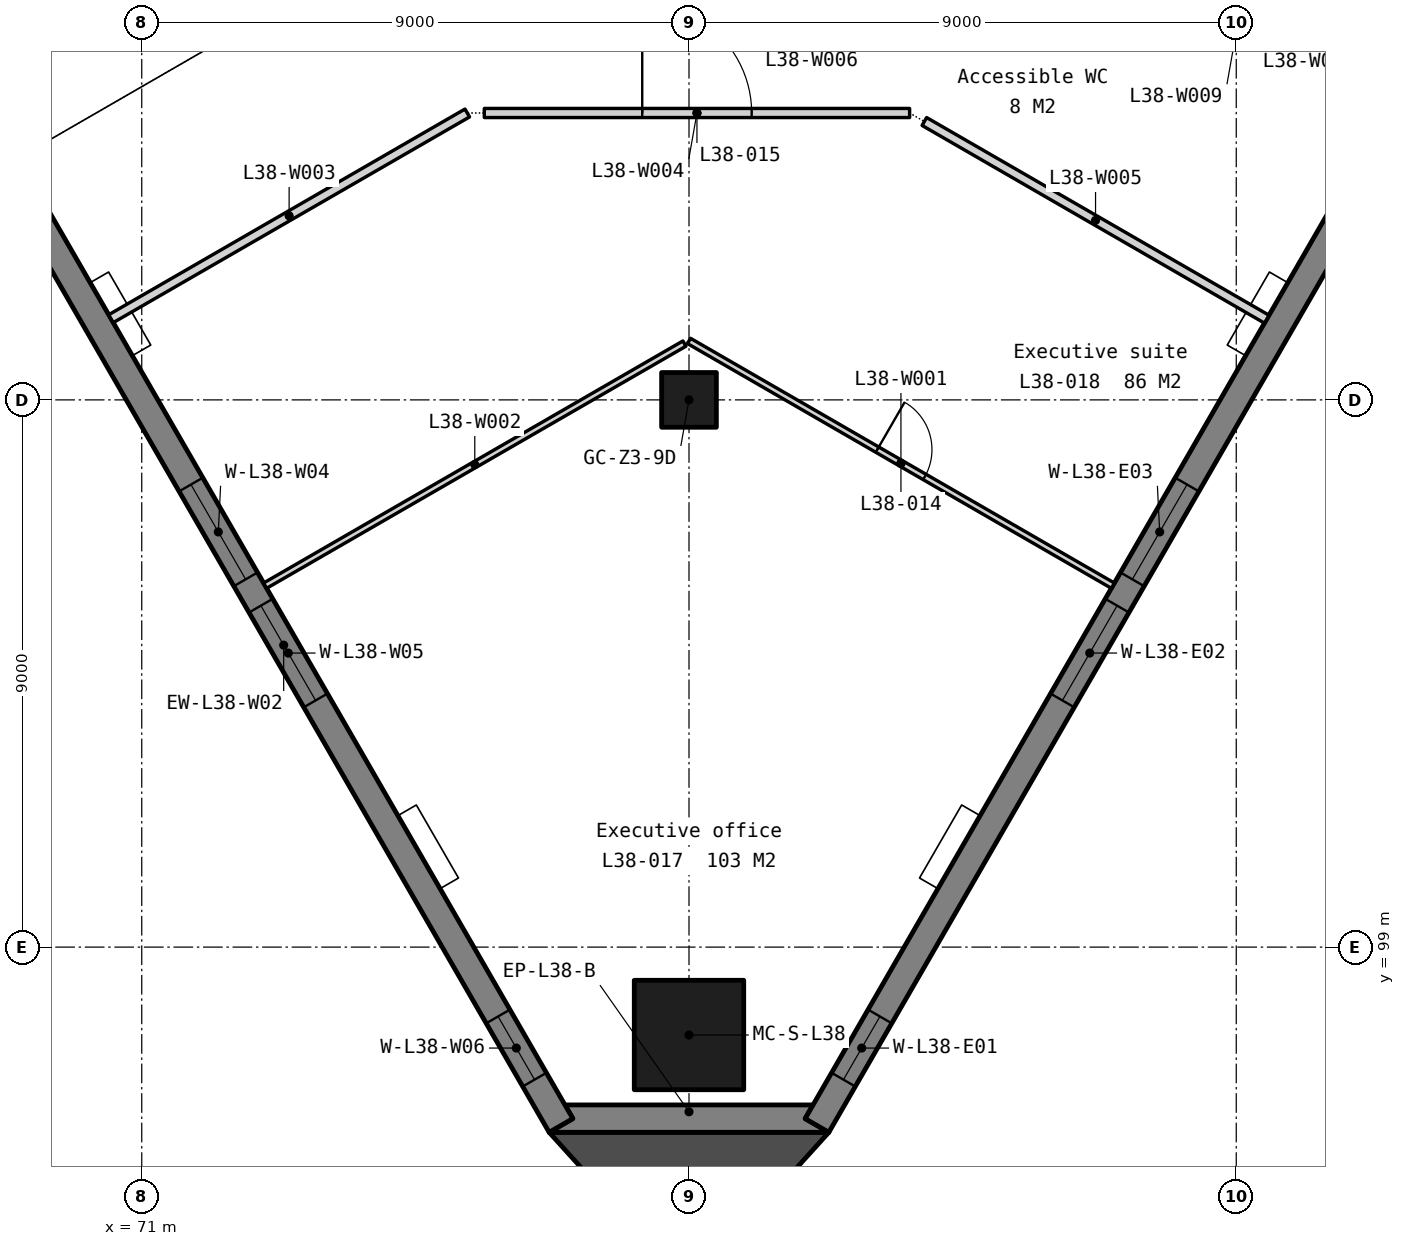
"""IFC4 building model, lengths in metres.
Left out: names, types, materials, properties, quantities, classifications, styles, units other than length and angle.
Written with IfcOpenShell. Run it as: python <this file> out.ifc"""

import sys

from ifc_helpers import new_model, si_unit, direction, frame, frame_2d, origin, origin_2d, place, context, subcontext, project, spatial, polyline, rectangle, outline, extrude, element, fill, save


model = new_model("IFC4")
c1 = context("Model", 3, precision=1e-05, world=origin(), true_north=direction((0.0, 1.0)))
c2 = subcontext(c1, "Body", "Model", "MODEL_VIEW")
j1 = project(units=[si_unit("LENGTHUNIT", "METRE"), si_unit("PLANEANGLEUNIT", "RADIAN")], contexts=[c1])
p1 = place(None, origin())
s1 = spatial("IfcSite", under=j1, at=p1, CompositionType="ELEMENT")
p2 = place(p1, origin())
s2 = spatial("IfcBuilding", under=s1, at=p2, CompositionType="ELEMENT")
p3 = place(p2, frame((0.0, 0.0, 152.0)))
s3 = spatial("IfcBuildingStorey", under=s2, at=p3, CompositionType="ELEMENT", Elevation=152.0)
p4 = place(p3, frame((80.0, 108.0, 0.0), z_axis=(0.0, 0.0, 1.0), x_axis=(1.0, 0.0, 0.0)))
e1 = element("IfcColumn", 1, at=p4, inside=s3, PredefinedType="COLUMN", context=c2, shape_type="SweptSolid", body=[
    extrude(rectangle(XDim=0.9, YDim=0.9, at=origin_2d()), origin(), (0.0, 0.0, 1.0), 3.9),
])
p5 = place(p3, frame((80.0, 97.554, 0.0), z_axis=(0.0, 0.0, 1.0), x_axis=(1.0, 0.0, 0.0)))
e2 = element("IfcColumn", 2, at=p5, inside=s3, PredefinedType="COLUMN", context=c2, shape_type="SweptSolid", body=[
    extrude(rectangle(XDim=1.8, YDim=1.8, at=origin_2d()), origin(), (0.0, 0.0, 1.0), 3.9),
])
p6 = place(p3, frame((0.0, 0.0, -0.15)))
e3 = element("IfcWall", 3, at=p6, inside=s3, PredefinedType="SOLIDWALL", context=c2, shape_type="SweptSolid", body=[
    extrude(outline(polyline([(77.7, 95.954), (78.09, 96.179), (77.96, 96.404), (82.04, 96.404), (81.91, 96.179), (82.3, 95.954), (77.7, 95.954)])), origin(), (0.0, 0.0, 1.0), 3.9),
])
p7 = place(p3, frame((68.773, 111.866, -0.15), z_axis=(0.0, 0.0, 1.0), x_axis=(0.499989280757, -0.866031592454, 0.0)))
e4 = element("IfcWall", 4, at=p7, inside=s3, PredefinedType="SOLIDWALL", context=c2, shape_type="SweptSolid", body=[
    extrude(outline(polyline([(18.243, 3.9), (18.243, 0.0), (0.0, 0.0), (0.0, 3.9), (18.243, 3.9)])), frame((0.0, 0.225, 0.0), z_axis=(0.0, -1.0, 0.0), x_axis=(1.0, 0.0, 0.0)), (0.0, 0.0, 1.0), 0.45),
])
p8 = place(p7, frame((6.072, 0.0, 0.95)))
e5 = element("IfcOpeningElement", 5, at=p8, cuts=e4, PredefinedType="OPENING", context=c2, shape_type="SweptSolid", body=[
    extrude(rectangle(XDim=1.8, YDim=2.2, at=frame_2d((0.9, 1.1))), frame((0.0, 0.235, 0.0), z_axis=(0.0, -1.0, 0.0), x_axis=(1.0, 0.0, 0.0)), (0.0, 0.0, 1.0), 0.47),
])
p9 = place(p7, frame((8.372, 0.0, 0.95)))
e6 = element("IfcOpeningElement", 6, at=p9, cuts=e4, PredefinedType="OPENING", context=c2, shape_type="SweptSolid", body=[
    extrude(rectangle(XDim=1.8, YDim=2.2, at=frame_2d((0.9, 1.1))), frame((0.0, 0.235, 0.0), z_axis=(0.0, -1.0, 0.0), x_axis=(1.0, 0.0, 0.0)), (0.0, 0.0, 1.0), 0.47),
])
p10 = place(p7, frame((16.173, 0.0, 0.95)))
e7 = element("IfcOpeningElement", 7, at=p10, cuts=e4, PredefinedType="OPENING", context=c2, shape_type="SweptSolid", body=[
    extrude(rectangle(XDim=1.2, YDim=2.2, at=frame_2d((0.6, 1.1))), frame((0.0, 0.235, 0.0), z_axis=(0.0, -1.0, 0.0), x_axis=(1.0, 0.0, 0.0)), (0.0, 0.0, 1.0), 0.47),
])
p11 = place(p3, frame((82.105, 96.067, -0.15), z_axis=(0.0, 0.0, 1.0), x_axis=(0.499997369791, 0.866026922331, 0.0)))
e8 = element("IfcWall", 8, at=p11, inside=s3, PredefinedType="SOLIDWALL", context=c2, shape_type="SweptSolid", body=[
    extrude(outline(polyline([(40.486, 0.0), (40.486, 3.9), (0.0, 3.9), (0.0, 0.0), (40.486, 0.0)])), frame((0.0, 0.225, 0.0), z_axis=(0.0, -1.0, 0.0), x_axis=(1.0, 0.0, 0.0)), (0.0, 0.0, 1.0), 0.45),
])
p12 = place(p11, frame((0.87, 0.0, 0.95)))
e9 = element("IfcOpeningElement", 9, at=p12, cuts=e8, PredefinedType="OPENING", context=c2, shape_type="SweptSolid", body=[
    extrude(rectangle(XDim=1.2, YDim=2.2, at=frame_2d((0.6, 1.1))), frame((0.0, 0.235, 0.0), z_axis=(0.0, -1.0, 0.0), x_axis=(1.0, 0.0, 0.0)), (0.0, 0.0, 1.0), 0.47),
])
p13 = place(p11, frame((8.072, 0.0, 0.95)))
e10 = element("IfcOpeningElement", 10, at=p13, cuts=e8, PredefinedType="OPENING", context=c2, shape_type="SweptSolid", body=[
    extrude(rectangle(XDim=1.8, YDim=2.2, at=frame_2d((0.9, 1.1))), frame((0.0, 0.235, 0.0), z_axis=(0.0, -1.0, 0.0), x_axis=(1.0, 0.0, 0.0)), (0.0, 0.0, 1.0), 0.47),
])
p14 = place(p11, frame((10.372, 0.0, 0.95)))
e11 = element("IfcOpeningElement", 11, at=p14, cuts=e8, PredefinedType="OPENING", context=c2, shape_type="SweptSolid", body=[
    extrude(rectangle(XDim=1.8, YDim=2.2, at=frame_2d((0.9, 1.1))), frame((0.0, 0.235, 0.0), z_axis=(0.0, -1.0, 0.0), x_axis=(1.0, 0.0, 0.0)), (0.0, 0.0, 1.0), 0.47),
])
p15 = place(p11, frame((18.193, 0.0, 0.95)))
e12 = element("IfcOpeningElement", 12, at=p15, cuts=e8, PredefinedType="OPENING", context=c2, shape_type="SweptSolid", body=[
    extrude(rectangle(XDim=1.8, YDim=2.2, at=frame_2d((0.9, 1.1))), frame((0.0, 0.235, 0.0), z_axis=(0.0, -1.0, 0.0), x_axis=(1.0, 0.0, 0.0)), (0.0, 0.0, 1.0), 0.47),
])
p16 = place(p11, frame((20.493, 0.0, 0.95)))
e13 = element("IfcOpeningElement", 13, at=p16, cuts=e8, PredefinedType="OPENING", context=c2, shape_type="SweptSolid", body=[
    extrude(rectangle(XDim=1.8, YDim=2.2, at=frame_2d((0.9, 1.1))), frame((0.0, 0.235, 0.0), z_axis=(0.0, -1.0, 0.0), x_axis=(1.0, 0.0, 0.0)), (0.0, 0.0, 1.0), 0.47),
])
p17 = place(p11, frame((28.315, 0.0, 0.95)))
e14 = element("IfcOpeningElement", 14, at=p17, cuts=e8, PredefinedType="OPENING", context=c2, shape_type="SweptSolid", body=[
    extrude(rectangle(XDim=1.8, YDim=2.2, at=frame_2d((0.9, 1.1))), frame((0.0, 0.235, 0.0), z_axis=(0.0, -1.0, 0.0), x_axis=(1.0, 0.0, 0.0)), (0.0, 0.0, 1.0), 0.47),
])
p18 = place(p11, frame((30.615, 0.0, 0.95)))
e15 = element("IfcOpeningElement", 15, at=p18, cuts=e8, PredefinedType="OPENING", context=c2, shape_type="SweptSolid", body=[
    extrude(rectangle(XDim=1.8, YDim=2.2, at=frame_2d((0.9, 1.1))), frame((0.0, 0.235, 0.0), z_axis=(0.0, -1.0, 0.0), x_axis=(1.0, 0.0, 0.0)), (0.0, 0.0, 1.0), 0.47),
])
p19 = place(p11, frame((38.417, 0.0, 0.95)))
e16 = element("IfcOpeningElement", 16, at=p19, cuts=e8, PredefinedType="OPENING", context=c2, shape_type="SweptSolid", body=[
    extrude(rectangle(XDim=1.2, YDim=2.2, at=frame_2d((0.6, 1.1))), frame((0.0, 0.235, 0.0), z_axis=(0.0, -1.0, 0.0), x_axis=(1.0, 0.0, 0.0)), (0.0, 0.0, 1.0), 0.47),
])
p20 = place(p2, frame((0.0, 0.0, 148.1)))
s4 = spatial("IfcBuildingStorey", under=s2, at=p20, CompositionType="ELEMENT", Elevation=148.1)
p21 = place(p20, frame((68.466, 111.948, 0.0), z_axis=(0.0, 0.0, 1.0), x_axis=(0.866005453737, 0.500034552904, 0.0)))
e17 = element("IfcWall", 17, at=p21, inside=s4, PredefinedType="SOLIDWALL", context=c2, shape_type="SweptSolid", body=[
    extrude(rectangle(XDim=3.95, YDim=0.45, at=frame_2d((1.975, 0.0))), origin(), (0.0, 0.0, 1.0), 7.65),
])
p22 = place(p3, frame((0.0, 0.0, -0.15)))
e18 = element("IfcWall", 18, at=p22, inside=s3, PredefinedType="SOLIDWALL", context=c2, shape_type="SweptSolid", body=[
    extrude(outline(polyline([(77.7, 95.954), (80.0, 93.414), (82.3, 95.954), (77.7, 95.954)])), origin(), (0.0, 0.0, 1.0), 3.9),
])
p23 = place(p3, frame((80.0, 108.969, 0.0), z_axis=(0.0, 0.0, 1.0), x_axis=(0.86602648383, -0.499998129301, 0.0)))
e19 = element("IfcWall", 19, at=p23, inside=s3, PredefinedType="PARTITIONING", context=c2, shape_type="SweptSolid", body=[
    extrude(rectangle(XDim=8.049, YDim=0.1, at=frame_2d((4.025, 0.0))), origin(), (0.0, 0.0, 1.0), 3.75),
])
p24 = place(p23, frame((3.575, 0.0, 0.0)))
e20 = element("IfcOpeningElement", 20, at=p24, cuts=e19, PredefinedType="OPENING", context=c2, shape_type="SweptSolid", body=[
    extrude(rectangle(XDim=0.9, YDim=2.1, at=frame_2d((0.45, 1.05))), frame((0.0, 0.06, 0.0), z_axis=(0.0, -1.0, 0.0), x_axis=(1.0, 0.0, 0.0)), (0.0, 0.0, 1.0), 0.12),
])
p25 = place(p3, frame((73.029, 104.945, 0.0), z_axis=(0.0, 0.0, 1.0), x_axis=(0.866023222546, 0.500003777996, 0.0)))
e21 = element("IfcWall", 21, at=p25, inside=s3, PredefinedType="PARTITIONING", context=c2, shape_type="SweptSolid", body=[
    extrude(rectangle(XDim=7.963, YDim=0.1, at=frame_2d((3.981, 0.0))), origin(), (0.0, 0.0, 1.0), 3.75),
])
p26 = place(p3, frame((70.494, 109.335, 0.0), z_axis=(0.0, 0.0, 1.0), x_axis=(0.866025150839, 0.500000438114, 0.0)))
e22 = element("IfcWall", 22, at=p26, inside=s3, PredefinedType="PARTITIONING", context=c2, shape_type="SweptSolid", body=[
    extrude(rectangle(XDim=6.766, YDim=0.15, at=frame_2d((3.383, 0.0))), origin(), (0.0, 0.0, 1.0), 3.75),
])
p27 = place(p3, frame((76.634, 112.719, 0.0), z_axis=(0.0, 0.0, 1.0), x_axis=(1.0, 0.0, 0.0)))
e23 = element("IfcWall", 23, at=p27, inside=s3, PredefinedType="PARTITIONING", context=c2, shape_type="SweptSolid", body=[
    extrude(rectangle(XDim=6.995, YDim=0.15, at=frame_2d((3.497, 0.0))), origin(), (0.0, 0.0, 1.0), 3.75),
])
p28 = place(p27, frame((2.597, 0.0, 0.0)))
e24 = element("IfcOpeningElement", 24, at=p28, cuts=e23, PredefinedType="OPENING", context=c2, shape_type="SweptSolid", body=[
    extrude(rectangle(XDim=1.8, YDim=2.1, at=frame_2d((0.9, 1.05))), frame((0.0, 0.085, 0.0), z_axis=(0.0, -1.0, 0.0), x_axis=(1.0, 0.0, 0.0)), (0.0, 0.0, 1.0), 0.17),
])
p29 = place(p3, frame((83.871, 112.579, 0.0), z_axis=(0.0, 0.0, 1.0), x_axis=(0.866009251978, -0.500027974705, 0.0)))
e25 = element("IfcWall", 25, at=p29, inside=s3, PredefinedType="PARTITIONING", context=c2, shape_type="SweptSolid", body=[
    extrude(rectangle(XDim=6.502, YDim=0.15, at=frame_2d((3.251, 0.0))), origin(), (0.0, 0.0, 1.0), 3.75),
])
p30 = place(p8, origin())
e26 = element("IfcWindow", 26, at=p30, inside=s3, PartitioningType="SINGLE_PANEL", PredefinedType="WINDOW", context=c2, shape_type="SweptSolid", body=[
    extrude(rectangle(XDim=1.8, YDim=2.2, at=frame_2d((0.9, 1.1))), frame((0.0, 0.03, 0.0), z_axis=(0.0, -1.0, 0.0), x_axis=(1.0, 0.0, 0.0)), (0.0, 0.0, 1.0), 0.06),
])
fill(e5, e26)
p31 = place(p9, origin())
e27 = element("IfcWindow", 27, at=p31, inside=s3, PartitioningType="SINGLE_PANEL", PredefinedType="WINDOW", context=c2, shape_type="SweptSolid", body=[
    extrude(rectangle(XDim=1.8, YDim=2.2, at=frame_2d((0.9, 1.1))), frame((0.0, 0.03, 0.0), z_axis=(0.0, -1.0, 0.0), x_axis=(1.0, 0.0, 0.0)), (0.0, 0.0, 1.0), 0.06),
])
fill(e6, e27)
p32 = place(p10, origin())
e28 = element("IfcWindow", 28, at=p32, inside=s3, PartitioningType="SINGLE_PANEL", PredefinedType="WINDOW", context=c2, shape_type="SweptSolid", body=[
    extrude(rectangle(XDim=1.2, YDim=2.2, at=frame_2d((0.6, 1.1))), frame((0.0, 0.03, 0.0), z_axis=(0.0, -1.0, 0.0), x_axis=(1.0, 0.0, 0.0)), (0.0, 0.0, 1.0), 0.06),
])
fill(e7, e28)
p33 = place(p12, origin())
e29 = element("IfcWindow", 29, at=p33, inside=s3, PartitioningType="SINGLE_PANEL", PredefinedType="WINDOW", context=c2, shape_type="SweptSolid", body=[
    extrude(rectangle(XDim=1.2, YDim=2.2, at=frame_2d((0.6, 1.1))), frame((0.0, 0.03, 0.0), z_axis=(0.0, -1.0, 0.0), x_axis=(1.0, 0.0, 0.0)), (0.0, 0.0, 1.0), 0.06),
])
fill(e9, e29)
p34 = place(p13, origin())
e30 = element("IfcWindow", 30, at=p34, inside=s3, PartitioningType="SINGLE_PANEL", PredefinedType="WINDOW", context=c2, shape_type="SweptSolid", body=[
    extrude(rectangle(XDim=1.8, YDim=2.2, at=frame_2d((0.9, 1.1))), frame((0.0, 0.03, 0.0), z_axis=(0.0, -1.0, 0.0), x_axis=(1.0, 0.0, 0.0)), (0.0, 0.0, 1.0), 0.06),
])
fill(e10, e30)
p35 = place(p14, origin())
e31 = element("IfcWindow", 31, at=p35, inside=s3, PartitioningType="SINGLE_PANEL", PredefinedType="WINDOW", context=c2, shape_type="SweptSolid", body=[
    extrude(rectangle(XDim=1.8, YDim=2.2, at=frame_2d((0.9, 1.1))), frame((0.0, 0.03, 0.0), z_axis=(0.0, -1.0, 0.0), x_axis=(1.0, 0.0, 0.0)), (0.0, 0.0, 1.0), 0.06),
])
fill(e11, e31)
p36 = place(p24, origin())
e32 = element("IfcDoor", 32, at=p36, inside=s3, OperationType="SINGLE_SWING_LEFT", PredefinedType="DOOR", context=c2, shape_type="SweptSolid", body=[
    extrude(rectangle(XDim=0.9, YDim=2.1, at=frame_2d((0.45, 1.05))), frame((0.0, 0.025, 0.0), z_axis=(0.0, -1.0, 0.0), x_axis=(1.0, 0.0, 0.0)), (0.0, 0.0, 1.0), 0.05),
])
fill(e20, e32)
p37 = place(p28, origin())
e33 = element("IfcDoor", 33, at=p37, inside=s3, OperationType="SINGLE_SWING_LEFT", PredefinedType="DOOR", context=c2, shape_type="SweptSolid", body=[
    extrude(rectangle(XDim=1.8, YDim=2.1, at=frame_2d((0.9, 1.05))), frame((0.0, 0.025, 0.0), z_axis=(0.0, -1.0, 0.0), x_axis=(1.0, 0.0, 0.0)), (0.0, 0.0, 1.0), 0.05),
])
fill(e24, e33)
save(model, sys.argv[1])
